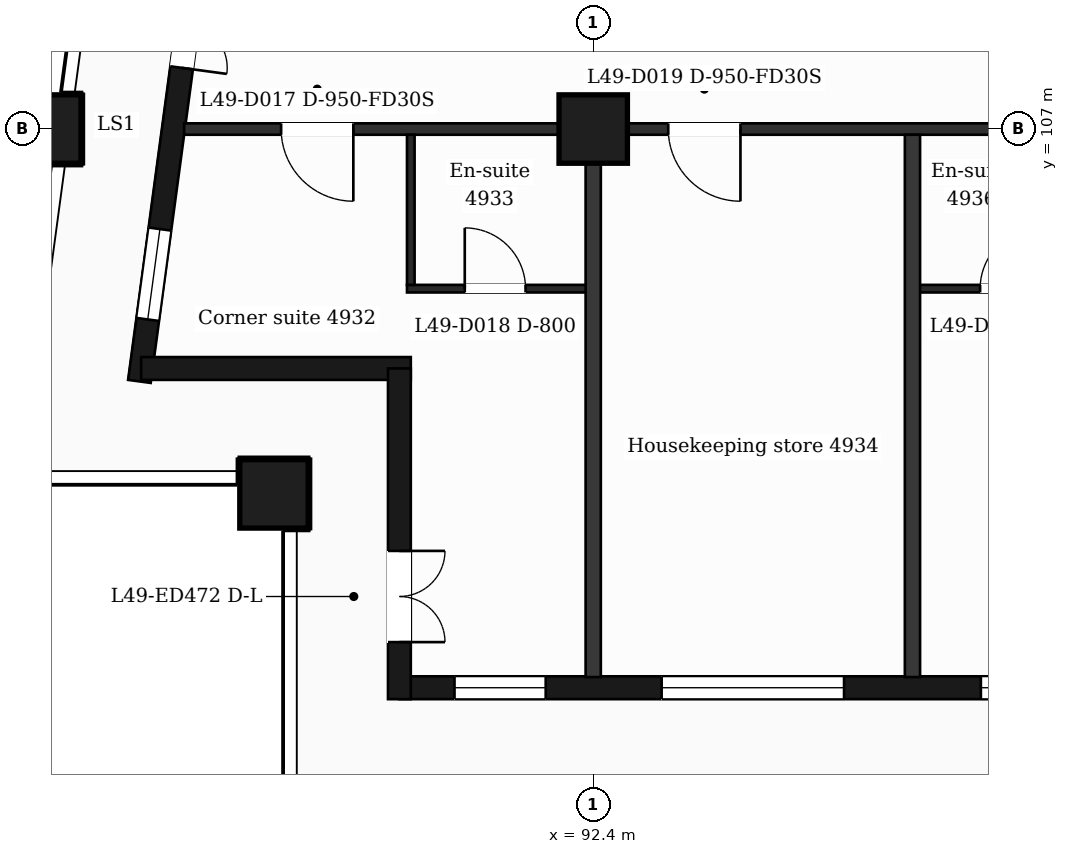
"""IFC4 building model, lengths in metres.
Left out: names, types, materials, properties, quantities, classifications, styles, units other than length and angle.
Written with IfcOpenShell. Run it as: python <this file> out.ifc"""

import sys

from ifc_helpers import new_model, si_unit, direction, frame, frame_2d, origin, origin_2d, place, context, subcontext, project, spatial, rectangle, extrude, element, fill, save


model = new_model("IFC4")
c1 = context("Model", 3, precision=1e-05, world=origin(), true_north=direction((0.0, 1.0)))
c2 = subcontext(c1, "Body", "Model", "MODEL_VIEW")
j1 = project(units=[si_unit("LENGTHUNIT", "METRE"), si_unit("PLANEANGLEUNIT", "RADIAN")], contexts=[c1])
p1 = place(None, origin())
s1 = spatial("IfcSite", under=j1, at=p1, CompositionType="ELEMENT")
p2 = place(p1, origin())
s2 = spatial("IfcBuilding", under=s1, at=p2, CompositionType="ELEMENT")
p3 = place(p2, frame((0.0, 0.0, 205.9)))
s3 = spatial("IfcBuildingStorey", under=s2, at=p3, CompositionType="ELEMENT", Elevation=205.9)
for number, where, z_axis, x_axis in (
    (1, (88.2, 102.2, 0.0), (0.0, 0.0, 1.0), (1.0, 0.0, 0.0)),
    (2, (92.4, 107.0, 0.0), (0.0, 0.0, 1.0), (1.0, 0.0, 0.0)),
    (3, (85.211, 107.0, 0.0), (0.0, 0.0, 1.0), (1.0, 0.0, 0.0)),
):
    element("IfcColumn", number, at=place(p3, frame(where, z_axis=z_axis, x_axis=x_axis)), inside=s3, PredefinedType="COLUMN", context=c2, shape_type="SweptSolid", body=[
        extrude(rectangle(XDim=0.9, YDim=0.9, at=origin_2d()), origin(), (0.0, 0.0, 1.0), 3.7),
    ])
p4 = place(p3, frame((89.85, 99.65, 0.0), z_axis=(0.0, 0.0, 1.0), x_axis=(1.0, 0.0, 0.0)))
e4 = element("IfcWall", 4, at=p4, inside=s3, PredefinedType="SOLIDWALL", context=c2, shape_type="SweptSolid", body=[
    extrude(rectangle(XDim=47.25, YDim=0.3, at=frame_2d((23.625, 0.0))), origin(), (0.0, 0.0, 1.0), 3.38),
])
p5 = place(p4, frame((0.725, 0.0, 0.9)))
e5 = element("IfcOpeningElement", 5, at=p5, cuts=e4, PredefinedType="OPENING", context=c2, shape_type="SweptSolid", body=[
    extrude(rectangle(XDim=1.2, YDim=2.1, at=frame_2d((0.6, 1.05))), frame((0.0, 0.16, 0.0), z_axis=(0.0, -1.0, 0.0), x_axis=(1.0, 0.0, 0.0)), (0.0, 0.0, 1.0), 0.32),
])
p6 = place(p4, frame((3.45, 0.0, 0.9)))
e6 = element("IfcOpeningElement", 6, at=p6, cuts=e4, PredefinedType="OPENING", context=c2, shape_type="SweptSolid", body=[
    extrude(rectangle(XDim=2.4, YDim=2.1, at=frame_2d((1.2, 1.05))), frame((0.0, 0.16, 0.0), z_axis=(0.0, -1.0, 0.0), x_axis=(1.0, 0.0, 0.0)), (0.0, 0.0, 1.0), 0.32),
])
p7 = place(p4, frame((7.65, 0.0, 0.9)))
e7 = element("IfcOpeningElement", 7, at=p7, cuts=e4, PredefinedType="OPENING", context=c2, shape_type="SweptSolid", body=[
    extrude(rectangle(XDim=2.4, YDim=2.1, at=frame_2d((1.2, 1.05))), frame((0.0, 0.16, 0.0), z_axis=(0.0, -1.0, 0.0), x_axis=(1.0, 0.0, 0.0)), (0.0, 0.0, 1.0), 0.32),
])
p8 = place(p4, frame((11.85, 0.0, 0.9)))
e8 = element("IfcOpeningElement", 8, at=p8, cuts=e4, PredefinedType="OPENING", context=c2, shape_type="SweptSolid", body=[
    extrude(rectangle(XDim=2.4, YDim=2.1, at=frame_2d((1.2, 1.05))), frame((0.0, 0.16, 0.0), z_axis=(0.0, -1.0, 0.0), x_axis=(1.0, 0.0, 0.0)), (0.0, 0.0, 1.0), 0.32),
])
p9 = place(p4, frame((16.05, 0.0, 0.9)))
e9 = element("IfcOpeningElement", 9, at=p9, cuts=e4, PredefinedType="OPENING", context=c2, shape_type="SweptSolid", body=[
    extrude(rectangle(XDim=2.4, YDim=2.1, at=frame_2d((1.2, 1.05))), frame((0.0, 0.16, 0.0), z_axis=(0.0, -1.0, 0.0), x_axis=(1.0, 0.0, 0.0)), (0.0, 0.0, 1.0), 0.32),
])
p10 = place(p4, frame((20.25, 0.0, 0.9)))
e10 = element("IfcOpeningElement", 10, at=p10, cuts=e4, PredefinedType="OPENING", context=c2, shape_type="SweptSolid", body=[
    extrude(rectangle(XDim=2.4, YDim=2.1, at=frame_2d((1.2, 1.05))), frame((0.0, 0.16, 0.0), z_axis=(0.0, -1.0, 0.0), x_axis=(1.0, 0.0, 0.0)), (0.0, 0.0, 1.0), 0.32),
])
p11 = place(p4, frame((25.05, 0.0, 0.9)))
e11 = element("IfcOpeningElement", 11, at=p11, cuts=e4, PredefinedType="OPENING", context=c2, shape_type="SweptSolid", body=[
    extrude(rectangle(XDim=1.2, YDim=2.1, at=frame_2d((0.6, 1.05))), frame((0.0, 0.16, 0.0), z_axis=(0.0, -1.0, 0.0), x_axis=(1.0, 0.0, 0.0)), (0.0, 0.0, 1.0), 0.32),
])
p12 = place(p4, frame((29.25, 0.0, 0.9)))
e12 = element("IfcOpeningElement", 12, at=p12, cuts=e4, PredefinedType="OPENING", context=c2, shape_type="SweptSolid", body=[
    extrude(rectangle(XDim=1.2, YDim=2.1, at=frame_2d((0.6, 1.05))), frame((0.0, 0.16, 0.0), z_axis=(0.0, -1.0, 0.0), x_axis=(1.0, 0.0, 0.0)), (0.0, 0.0, 1.0), 0.32),
])
p13 = place(p4, frame((32.55, 0.0, 0.0)))
e13 = element("IfcOpeningElement", 13, at=p13, cuts=e4, PredefinedType="OPENING", context=c2, shape_type="SweptSolid", body=[
    extrude(rectangle(XDim=1.2, YDim=2.4, at=frame_2d((0.6, 1.2))), frame((0.0, 0.16, 0.0), z_axis=(0.0, -1.0, 0.0), x_axis=(1.0, 0.0, 0.0)), (0.0, 0.0, 1.0), 0.32),
])
p14 = place(p4, frame((34.35, 0.0, 0.9)))
e14 = element("IfcOpeningElement", 14, at=p14, cuts=e4, PredefinedType="OPENING", context=c2, shape_type="SweptSolid", body=[
    extrude(rectangle(XDim=1.2, YDim=2.1, at=frame_2d((0.6, 1.05))), frame((0.0, 0.16, 0.0), z_axis=(0.0, -1.0, 0.0), x_axis=(1.0, 0.0, 0.0)), (0.0, 0.0, 1.0), 0.32),
])
p15 = place(p4, frame((37.05, 0.0, 0.9)))
e15 = element("IfcOpeningElement", 15, at=p15, cuts=e4, PredefinedType="OPENING", context=c2, shape_type="SweptSolid", body=[
    extrude(rectangle(XDim=2.4, YDim=2.1, at=frame_2d((1.2, 1.05))), frame((0.0, 0.16, 0.0), z_axis=(0.0, -1.0, 0.0), x_axis=(1.0, 0.0, 0.0)), (0.0, 0.0, 1.0), 0.32),
])
p16 = place(p4, frame((40.95, 0.0, 0.0)))
e16 = element("IfcOpeningElement", 16, at=p16, cuts=e4, PredefinedType="OPENING", context=c2, shape_type="SweptSolid", body=[
    extrude(rectangle(XDim=1.2, YDim=2.4, at=frame_2d((0.6, 1.2))), frame((0.0, 0.16, 0.0), z_axis=(0.0, -1.0, 0.0), x_axis=(1.0, 0.0, 0.0)), (0.0, 0.0, 1.0), 0.32),
])
p17 = place(p4, frame((42.75, 0.0, 0.9)))
e17 = element("IfcOpeningElement", 17, at=p17, cuts=e4, PredefinedType="OPENING", context=c2, shape_type="SweptSolid", body=[
    extrude(rectangle(XDim=1.2, YDim=2.1, at=frame_2d((0.6, 1.05))), frame((0.0, 0.16, 0.0), z_axis=(0.0, -1.0, 0.0), x_axis=(1.0, 0.0, 0.0)), (0.0, 0.0, 1.0), 0.32),
])
p18 = place(p4, frame((45.25, 0.0, 0.9)))
e18 = element("IfcOpeningElement", 18, at=p18, cuts=e4, PredefinedType="OPENING", context=c2, shape_type="SweptSolid", body=[
    extrude(rectangle(XDim=1.2, YDim=2.1, at=frame_2d((0.6, 1.05))), frame((0.0, 0.16, 0.0), z_axis=(0.0, -1.0, 0.0), x_axis=(1.0, 0.0, 0.0)), (0.0, 0.0, 1.0), 0.32),
])
p19 = place(p3, frame((87.334, 110.4, 0.0), z_axis=(0.0, 0.0, 1.0), x_axis=(-0.133437175554, -0.991057273915, 0.0)))
e19 = element("IfcWall", 19, at=p19, inside=s3, PredefinedType="SOLIDWALL", context=c2, shape_type="SweptSolid", body=[
    extrude(rectangle(XDim=6.781, YDim=0.3, at=frame_2d((3.39, 0.0))), origin(), (0.0, 0.0, 1.0), 3.38),
])
p20 = place(p19, frame((1.418, 0.0, 0.0)))
e20 = element("IfcOpeningElement", 20, at=p20, cuts=e19, PredefinedType="OPENING", context=c2, shape_type="SweptSolid", body=[
    extrude(rectangle(XDim=1.2, YDim=2.4, at=frame_2d((0.6, 1.2))), frame((0.0, 0.16, 0.0), z_axis=(0.0, -1.0, 0.0), x_axis=(1.0, 0.0, 0.0)), (0.0, 0.0, 1.0), 0.32),
])
p21 = place(p19, frame((4.758, 0.0, 0.9)))
e21 = element("IfcOpeningElement", 21, at=p21, cuts=e19, PredefinedType="OPENING", context=c2, shape_type="SweptSolid", body=[
    extrude(rectangle(XDim=1.2, YDim=2.1, at=frame_2d((0.6, 1.05))), frame((0.0, 0.16, 0.0), z_axis=(0.0, -1.0, 0.0), x_axis=(1.0, 0.0, 0.0)), (0.0, 0.0, 1.0), 0.32),
])
p22 = place(p3, frame((86.452, 103.85, 0.0), z_axis=(0.0, 0.0, 1.0), x_axis=(1.0, 0.0, 0.0)))
e22 = element("IfcWall", 22, at=p22, inside=s3, PredefinedType="SOLIDWALL", context=c2, shape_type="SweptSolid", body=[
    extrude(rectangle(XDim=3.548, YDim=0.3, at=frame_2d((1.774, 0.0))), origin(), (0.0, 0.0, 1.0), 3.38),
])
p23 = place(p3, frame((89.85, 103.85, 0.0), z_axis=(0.0, 0.0, 1.0), x_axis=(0.0, -1.0, 0.0)))
e23 = element("IfcWall", 23, at=p23, inside=s3, PredefinedType="SOLIDWALL", context=c2, shape_type="SweptSolid", body=[
    extrude(rectangle(XDim=4.35, YDim=0.3, at=frame_2d((2.175, 0.0))), origin(), (0.0, 0.0, 1.0), 3.38),
])
p24 = place(p23, frame((2.4, 0.0, 0.0)))
e24 = element("IfcOpeningElement", 24, at=p24, cuts=e23, PredefinedType="OPENING", context=c2, shape_type="SweptSolid", body=[
    extrude(rectangle(XDim=1.2, YDim=2.4, at=frame_2d((0.6, 1.2))), frame((0.0, 0.16, 0.0), z_axis=(0.0, -1.0, 0.0), x_axis=(1.0, 0.0, 0.0)), (0.0, 0.0, 1.0), 0.32),
])
p25 = place(p3, frame((89.95, 104.9, 0.0), z_axis=(0.0, 0.0, 1.0), x_axis=(1.0, 0.0, 0.0)))
e25 = element("IfcWall", 25, at=p25, inside=s3, PredefinedType="PARTITIONING", context=c2, shape_type="SweptSolid", body=[
    extrude(rectangle(XDim=2.45, YDim=0.1, at=frame_2d((1.225, 0.0))), origin(), (0.0, 0.0, 1.0), 3.38),
])
p26 = place(p25, frame((0.76, 0.0, 0.0)))
e26 = element("IfcOpeningElement", 26, at=p26, cuts=e25, PredefinedType="OPENING", context=c2, shape_type="SweptSolid", body=[
    extrude(rectangle(XDim=0.8, YDim=2.1, at=frame_2d((0.4, 1.05))), frame((0.0, 0.06, 0.0), z_axis=(0.0, -1.0, 0.0), x_axis=(1.0, 0.0, 0.0)), (0.0, 0.0, 1.0), 0.12),
])
p27 = place(p3, frame((96.6, 104.9, 0.0), z_axis=(0.0, 0.0, 1.0), x_axis=(1.0, 0.0, 0.0)))
e27 = element("IfcWall", 27, at=p27, inside=s3, PredefinedType="PARTITIONING", context=c2, shape_type="SweptSolid", body=[
    extrude(rectangle(XDim=2.45, YDim=0.1, at=frame_2d((1.225, 0.0))), origin(), (0.0, 0.0, 1.0), 3.38),
])
p28 = place(p27, frame((0.89, 0.0, 0.0)))
e28 = element("IfcOpeningElement", 28, at=p28, cuts=e27, PredefinedType="OPENING", context=c2, shape_type="SweptSolid", body=[
    extrude(rectangle(XDim=0.8, YDim=2.1, at=frame_2d((0.4, 1.05))), frame((0.0, 0.06, 0.0), z_axis=(0.0, -1.0, 0.0), x_axis=(1.0, 0.0, 0.0)), (0.0, 0.0, 1.0), 0.12),
])
p29 = place(p3, frame((87.018, 107.0, 0.0), z_axis=(0.0, 0.0, 1.0), x_axis=(1.0, 0.0, 0.0)))
e29 = element("IfcWall", 29, at=p29, inside=s3, PredefinedType="PARTITIONING", context=c2, shape_type="SweptSolid", body=[
    extrude(rectangle(XDim=52.765, YDim=0.15, at=frame_2d((26.382, 0.0))), origin(), (0.0, 0.0, 1.0), 3.38),
])
p30 = place(p29, frame((1.276, 0.0, 0.0)))
e30 = element("IfcOpeningElement", 30, at=p30, cuts=e29, PredefinedType="OPENING", context=c2, shape_type="SweptSolid", body=[
    extrude(rectangle(XDim=0.95, YDim=2.1, at=frame_2d((0.475, 1.05))), frame((0.0, 0.085, 0.0), z_axis=(0.0, -1.0, 0.0), x_axis=(1.0, 0.0, 0.0)), (0.0, 0.0, 1.0), 0.17),
])
p31 = place(p29, frame((6.369, 0.0, 0.0)))
e31 = element("IfcOpeningElement", 31, at=p31, cuts=e29, PredefinedType="OPENING", context=c2, shape_type="SweptSolid", body=[
    extrude(rectangle(XDim=0.95, YDim=2.1, at=frame_2d((0.475, 1.05))), frame((0.0, 0.085, 0.0), z_axis=(0.0, -1.0, 0.0), x_axis=(1.0, 0.0, 0.0)), (0.0, 0.0, 1.0), 0.17),
])
p32 = place(p29, frame((12.112, 0.0, 0.0)))
e32 = element("IfcOpeningElement", 32, at=p32, cuts=e29, PredefinedType="OPENING", context=c2, shape_type="SweptSolid", body=[
    extrude(rectangle(XDim=0.95, YDim=2.1, at=frame_2d((0.475, 1.05))), frame((0.0, 0.085, 0.0), z_axis=(0.0, -1.0, 0.0), x_axis=(1.0, 0.0, 0.0)), (0.0, 0.0, 1.0), 0.17),
])
p33 = place(p29, frame((14.582, 0.0, 0.0)))
e33 = element("IfcOpeningElement", 33, at=p33, cuts=e29, PredefinedType="OPENING", context=c2, shape_type="SweptSolid", body=[
    extrude(rectangle(XDim=0.95, YDim=2.1, at=frame_2d((0.475, 1.05))), frame((0.0, 0.085, 0.0), z_axis=(0.0, -1.0, 0.0), x_axis=(1.0, 0.0, 0.0)), (0.0, 0.0, 1.0), 0.17),
])
p34 = place(p29, frame((20.512, 0.0, 0.0)))
e34 = element("IfcOpeningElement", 34, at=p34, cuts=e29, PredefinedType="OPENING", context=c2, shape_type="SweptSolid", body=[
    extrude(rectangle(XDim=0.95, YDim=2.1, at=frame_2d((0.475, 1.05))), frame((0.0, 0.085, 0.0), z_axis=(0.0, -1.0, 0.0), x_axis=(1.0, 0.0, 0.0)), (0.0, 0.0, 1.0), 0.17),
])
p35 = place(p29, frame((25.157, 0.0, 0.0)))
e35 = element("IfcOpeningElement", 35, at=p35, cuts=e29, PredefinedType="OPENING", context=c2, shape_type="SweptSolid", body=[
    extrude(rectangle(XDim=0.95, YDim=2.1, at=frame_2d((0.475, 1.05))), frame((0.0, 0.085, 0.0), z_axis=(0.0, -1.0, 0.0), x_axis=(1.0, 0.0, 0.0)), (0.0, 0.0, 1.0), 0.17),
])
p36 = place(p29, frame((26.657, 0.0, 0.0)))
e36 = element("IfcOpeningElement", 36, at=p36, cuts=e29, PredefinedType="OPENING", context=c2, shape_type="SweptSolid", body=[
    extrude(rectangle(XDim=0.95, YDim=2.1, at=frame_2d((0.475, 1.05))), frame((0.0, 0.085, 0.0), z_axis=(0.0, -1.0, 0.0), x_axis=(1.0, 0.0, 0.0)), (0.0, 0.0, 1.0), 0.17),
])
p37 = place(p29, frame((31.302, 0.0, 0.0)))
e37 = element("IfcOpeningElement", 37, at=p37, cuts=e29, PredefinedType="OPENING", context=c2, shape_type="SweptSolid", body=[
    extrude(rectangle(XDim=0.95, YDim=2.1, at=frame_2d((0.475, 1.05))), frame((0.0, 0.085, 0.0), z_axis=(0.0, -1.0, 0.0), x_axis=(1.0, 0.0, 0.0)), (0.0, 0.0, 1.0), 0.17),
])
p38 = place(p29, frame((41.207, 0.0, 0.0)))
e38 = element("IfcOpeningElement", 38, at=p38, cuts=e29, PredefinedType="OPENING", context=c2, shape_type="SweptSolid", body=[
    extrude(rectangle(XDim=1.0, YDim=2.1, at=frame_2d((0.5, 1.05))), frame((0.0, 0.085, 0.0), z_axis=(0.0, -1.0, 0.0), x_axis=(1.0, 0.0, 0.0)), (0.0, 0.0, 1.0), 0.17),
])
p39 = place(p29, frame((43.907, 0.0, 0.0)))
e39 = element("IfcOpeningElement", 39, at=p39, cuts=e29, PredefinedType="OPENING", context=c2, shape_type="SweptSolid", body=[
    extrude(rectangle(XDim=0.95, YDim=2.1, at=frame_2d((0.475, 1.05))), frame((0.0, 0.085, 0.0), z_axis=(0.0, -1.0, 0.0), x_axis=(1.0, 0.0, 0.0)), (0.0, 0.0, 1.0), 0.17),
])
p40 = place(p29, frame((49.285, 0.0, 0.0)))
e40 = element("IfcOpeningElement", 40, at=p40, cuts=e29, PredefinedType="OPENING", context=c2, shape_type="SweptSolid", body=[
    extrude(rectangle(XDim=0.95, YDim=2.1, at=frame_2d((0.475, 1.05))), frame((0.0, 0.085, 0.0), z_axis=(0.0, -1.0, 0.0), x_axis=(1.0, 0.0, 0.0)), (0.0, 0.0, 1.0), 0.17),
])
p41 = place(p3, frame((90.0, 104.95, 0.0), z_axis=(0.0, 0.0, 1.0), x_axis=(0.0, 1.0, 0.0)))
e41 = element("IfcWall", 41, at=p41, inside=s3, PredefinedType="PARTITIONING", context=c2, shape_type="SweptSolid", body=[
    extrude(rectangle(XDim=1.975, YDim=0.1, at=frame_2d((0.988, 0.0))), origin(), (0.0, 0.0, 1.0), 3.38),
])
for number, where, z_axis, x_axis in (
    (42, (92.4, 99.79, 0.0), (0.0, 0.0, 1.0), (0.0, 1.0, 0.0)),
    (43, (96.6, 99.79, 0.0), (0.0, 0.0, 1.0), (0.0, 1.0, 0.0)),
):
    element("IfcWall", number, at=place(p3, frame(where, z_axis=z_axis, x_axis=x_axis)), inside=s3, PredefinedType="PARTITIONING", context=c2, shape_type="SweptSolid", body=[
        extrude(rectangle(XDim=7.135, YDim=0.2, at=frame_2d((3.567, 0.0))), origin(), (0.0, 0.0, 1.0), 3.38),
    ])
p42 = place(p5, origin())
e44 = element("IfcWindow", 44, at=p42, inside=s3, PartitioningType="SINGLE_PANEL", PredefinedType="WINDOW", context=c2, shape_type="SweptSolid", body=[
    extrude(rectangle(XDim=1.2, YDim=2.1, at=frame_2d((0.6, 1.05))), frame((0.0, 0.03, 0.0), z_axis=(0.0, -1.0, 0.0), x_axis=(1.0, 0.0, 0.0)), (0.0, 0.0, 1.0), 0.06),
])
fill(e5, e44)
p43 = place(p6, origin())
e45 = element("IfcWindow", 45, at=p43, inside=s3, PartitioningType="SINGLE_PANEL", PredefinedType="WINDOW", context=c2, shape_type="SweptSolid", body=[
    extrude(rectangle(XDim=2.4, YDim=2.1, at=frame_2d((1.2, 1.05))), frame((0.0, 0.03, 0.0), z_axis=(0.0, -1.0, 0.0), x_axis=(1.0, 0.0, 0.0)), (0.0, 0.0, 1.0), 0.06),
])
fill(e6, e45)
p44 = place(p7, origin())
e46 = element("IfcWindow", 46, at=p44, inside=s3, PartitioningType="SINGLE_PANEL", PredefinedType="WINDOW", context=c2, shape_type="SweptSolid", body=[
    extrude(rectangle(XDim=2.4, YDim=2.1, at=frame_2d((1.2, 1.05))), frame((0.0, 0.03, 0.0), z_axis=(0.0, -1.0, 0.0), x_axis=(1.0, 0.0, 0.0)), (0.0, 0.0, 1.0), 0.06),
])
fill(e7, e46)
p45 = place(p20, origin())
e47 = element("IfcDoor", 47, at=p45, inside=s3, OperationType="DOUBLE_DOOR_SINGLE_SWING", PredefinedType="DOOR", context=c2, shape_type="SweptSolid", body=[
    extrude(rectangle(XDim=1.2, YDim=2.4, at=frame_2d((0.6, 1.2))), frame((0.0, 0.025, 0.0), z_axis=(0.0, -1.0, 0.0), x_axis=(1.0, 0.0, 0.0)), (0.0, 0.0, 1.0), 0.05),
])
fill(e20, e47)
p46 = place(p21, origin())
e48 = element("IfcWindow", 48, at=p46, inside=s3, PartitioningType="SINGLE_PANEL", PredefinedType="WINDOW", context=c2, shape_type="SweptSolid", body=[
    extrude(rectangle(XDim=1.2, YDim=2.1, at=frame_2d((0.6, 1.05))), frame((0.0, 0.03, 0.0), z_axis=(0.0, -1.0, 0.0), x_axis=(1.0, 0.0, 0.0)), (0.0, 0.0, 1.0), 0.06),
])
fill(e21, e48)
p47 = place(p24, origin())
e49 = element("IfcDoor", 49, at=p47, inside=s3, OperationType="DOUBLE_DOOR_SINGLE_SWING", PredefinedType="DOOR", context=c2, shape_type="SweptSolid", body=[
    extrude(rectangle(XDim=1.2, YDim=2.4, at=frame_2d((0.6, 1.2))), frame((0.0, 0.025, 0.0), z_axis=(0.0, -1.0, 0.0), x_axis=(1.0, 0.0, 0.0)), (0.0, 0.0, 1.0), 0.05),
])
fill(e24, e49)
p48 = place(p30, origin())
e50 = element("IfcDoor", 50, at=p48, inside=s3, OperationType="SINGLE_SWING_RIGHT", PredefinedType="DOOR", context=c2, shape_type="SweptSolid", body=[
    extrude(rectangle(XDim=0.95, YDim=2.1, at=frame_2d((0.475, 1.05))), frame((0.0, 0.025, 0.0), z_axis=(0.0, -1.0, 0.0), x_axis=(1.0, 0.0, 0.0)), (0.0, 0.0, 1.0), 0.05),
])
fill(e30, e50)
p49 = place(p26, origin())
e51 = element("IfcDoor", 51, at=p49, inside=s3, OperationType="SINGLE_SWING_LEFT", PredefinedType="DOOR", context=c2, shape_type="SweptSolid", body=[
    extrude(rectangle(XDim=0.8, YDim=2.1, at=frame_2d((0.4, 1.05))), frame((0.0, 0.025, 0.0), z_axis=(0.0, -1.0, 0.0), x_axis=(1.0, 0.0, 0.0)), (0.0, 0.0, 1.0), 0.05),
])
fill(e26, e51)
p50 = place(p31, origin())
e52 = element("IfcDoor", 52, at=p50, inside=s3, OperationType="SINGLE_SWING_RIGHT", PredefinedType="DOOR", context=c2, shape_type="SweptSolid", body=[
    extrude(rectangle(XDim=0.95, YDim=2.1, at=frame_2d((0.475, 1.05))), frame((0.0, 0.025, 0.0), z_axis=(0.0, -1.0, 0.0), x_axis=(1.0, 0.0, 0.0)), (0.0, 0.0, 1.0), 0.05),
])
fill(e31, e52)
p51 = place(p28, origin())
e53 = element("IfcDoor", 53, at=p51, inside=s3, OperationType="SINGLE_SWING_RIGHT", PredefinedType="DOOR", context=c2, shape_type="SweptSolid", body=[
    extrude(rectangle(XDim=0.8, YDim=2.1, at=frame_2d((0.4, 1.05))), frame((0.0, 0.025, 0.0), z_axis=(0.0, -1.0, 0.0), x_axis=(1.0, 0.0, 0.0)), (0.0, 0.0, 1.0), 0.05),
])
fill(e28, e53)
save(model, sys.argv[1])
